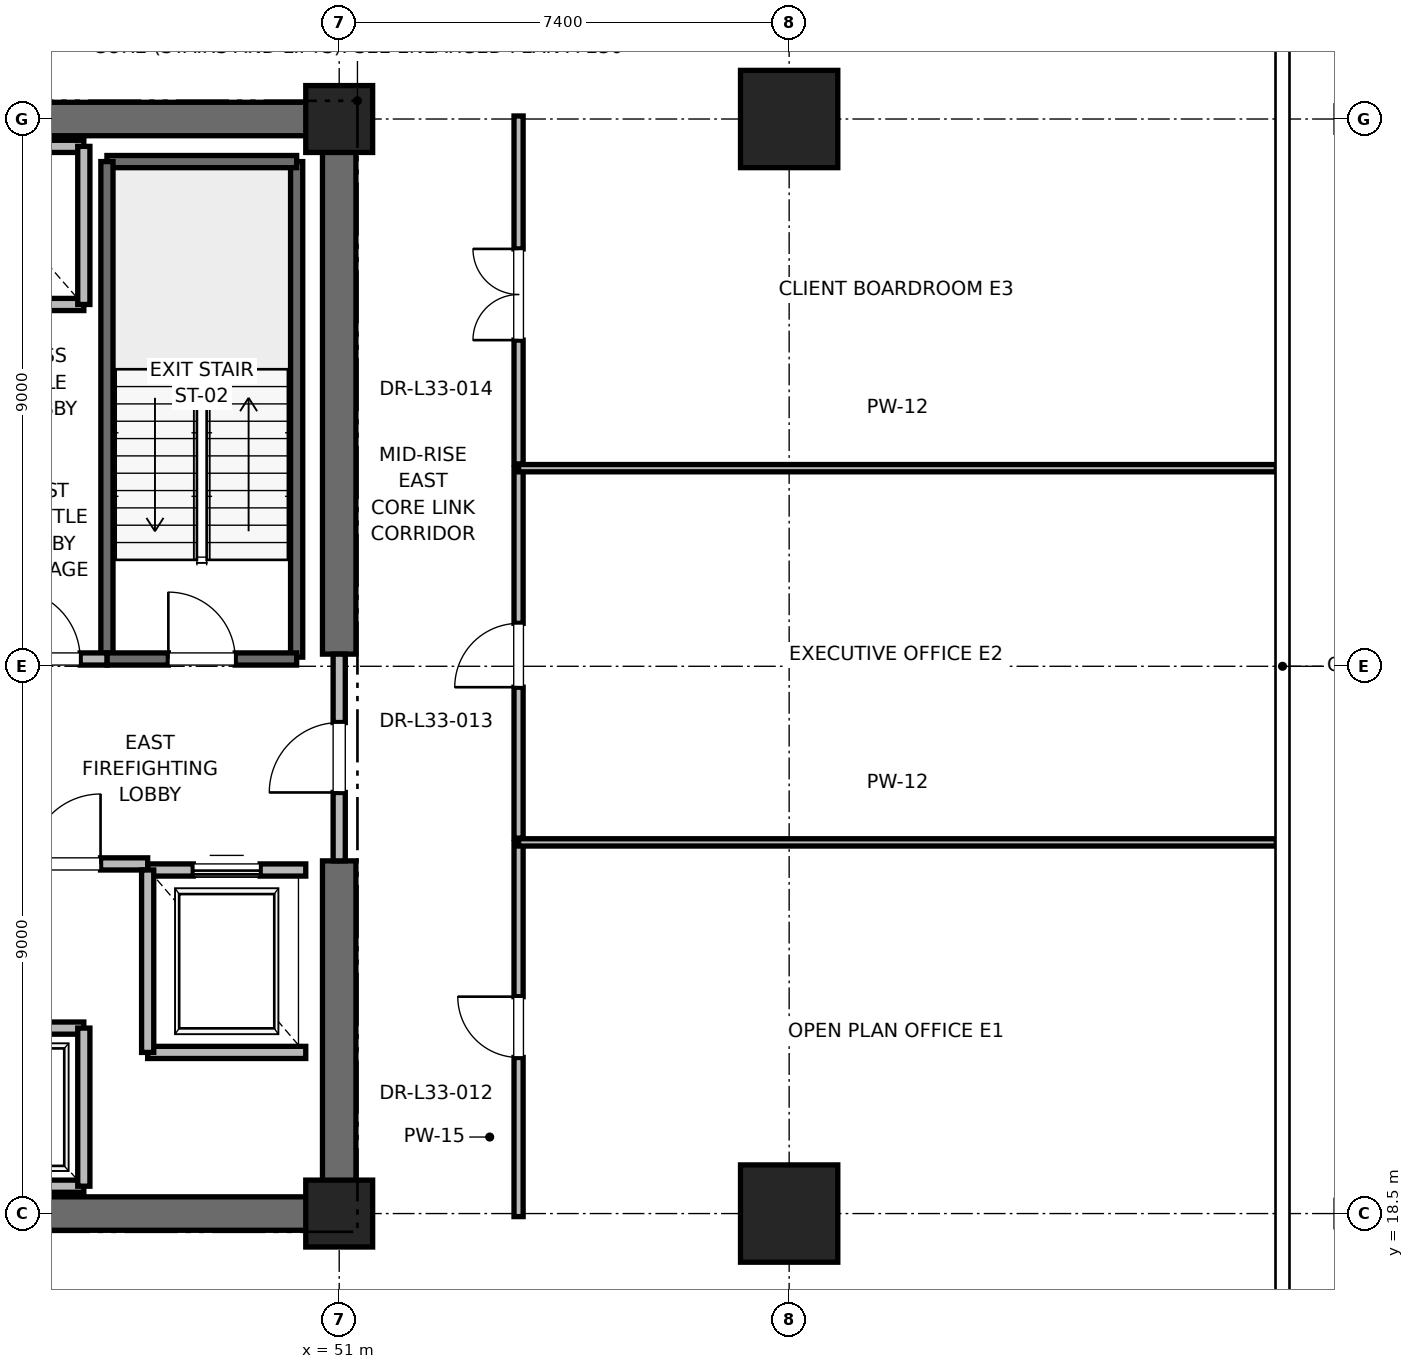
"""IFC4 building model, lengths in metres.
Left out: names, types, materials, properties, quantities, classifications, styles, units other than length and angle.
Written with IfcOpenShell. Run it as: python <this file> out.ifc"""

import sys

from ifc_helpers import new_model, si_unit, direction, frame, frame_2d, origin, origin_2d, place, context, subcontext, project, spatial, rectangle, extrude, element, fill, save


model = new_model("IFC4")
c1 = context("Model", 3, precision=1e-05, world=origin(), true_north=direction((0.0, 1.0)))
c2 = subcontext(c1, "Body", "Model", "MODEL_VIEW")
j1 = project(units=[si_unit("LENGTHUNIT", "METRE"), si_unit("PLANEANGLEUNIT", "RADIAN")], contexts=[c1])
p1 = place(None, origin())
s1 = spatial("IfcSite", under=j1, at=p1, CompositionType="ELEMENT")
p2 = place(p1, origin())
s2 = spatial("IfcBuilding", under=s1, at=p2, CompositionType="ELEMENT")
p3 = place(p2, frame((0.0, 0.0, 144.4)))
s3 = spatial("IfcBuildingStorey", under=s2, at=p3, CompositionType="ELEMENT", Elevation=144.4)
for number, where, z_axis, x_axis in (
    (1, (58.4, 18.5, 0.0), (0.0, 0.0, 1.0), (1.0, 0.0, 0.0)),
    (2, (58.4, 36.5, 0.0), (0.0, 0.0, 1.0), (1.0, 0.0, 0.0)),
):
    element("IfcColumn", number, at=place(p3, frame(where, z_axis=z_axis, x_axis=x_axis)), inside=s3, PredefinedType="COLUMN", context=c2, shape_type="SweptSolid", body=[
        extrude(rectangle(XDim=1.6, YDim=1.6, at=origin_2d()), origin(), (0.0, 0.0, 1.0), 4.0),
    ])
for number, where, z_axis, x_axis in (
    (3, (51.0, 18.5, 0.0), (0.0, 0.0, 1.0), (1.0, 0.0, 0.0)),
    (4, (51.0, 36.5, 0.0), (0.0, 0.0, 1.0), (1.0, 0.0, 0.0)),
):
    element("IfcColumn", number, at=place(p3, frame(where, z_axis=z_axis, x_axis=x_axis)), inside=s3, PredefinedType="PILASTER", context=c2, shape_type="SweptSolid", body=[
        extrude(rectangle(XDim=1.1, YDim=1.1, at=origin_2d()), origin(), (0.0, 0.0, 1.0), 4.0),
    ])
p4 = place(p3, frame((41.8, 18.5, 0.0), z_axis=(0.0, 0.0, 1.0), x_axis=(1.0, 0.0, 0.0)))
e5 = element("IfcWall", 5, at=p4, inside=s3, PredefinedType="SHEAR", context=c2, shape_type="SweptSolid", body=[
    extrude(rectangle(XDim=9.2, YDim=0.55, at=frame_2d((4.6, 0.0))), origin(), (0.0, 0.0, 1.0), 3.775),
])
for number, where, z_axis, x_axis in (
    (6, (45.2, 36.5, 0.0), (0.0, 0.0, 1.0), (1.0, 0.0, 0.0)),
    (7, (51.0, 18.5, 0.0), (0.0, 0.0, 1.0), (0.0, 1.0, 0.0)),
):
    element("IfcWall", number, at=place(p3, frame(where, z_axis=z_axis, x_axis=x_axis)), inside=s3, PredefinedType="SHEAR", context=c2, shape_type="SweptSolid", body=[
        extrude(rectangle(XDim=5.8, YDim=0.55, at=frame_2d((2.9, 0.0))), origin(), (0.0, 0.0, 1.0), 3.775),
    ])
p5 = place(p3, frame((51.0, 27.7, 0.0), z_axis=(0.0, 0.0, 1.0), x_axis=(0.0, 1.0, 0.0)))
e8 = element("IfcWall", 8, at=p5, inside=s3, PredefinedType="SHEAR", context=c2, shape_type="SweptSolid", body=[
    extrude(rectangle(XDim=8.8, YDim=0.55, at=frame_2d((4.4, 0.0))), origin(), (0.0, 0.0, 1.0), 3.775),
])
p6 = place(p3, frame((50.3, 27.65, 0.0), z_axis=(0.0, 0.0, 1.0), x_axis=(0.0, 1.0, 0.0)))
e9 = element("IfcWall", 9, at=p6, inside=s3, PredefinedType="SOLIDWALL", context=c2, shape_type="SweptSolid", body=[
    extrude(rectangle(XDim=8.15, YDim=0.2, at=frame_2d((4.075, 0.0))), origin(), (0.0, 0.0, 1.0), 3.775),
])
p7 = place(p3, frame((47.18, 35.8, 0.0), z_axis=(0.0, 0.0, 1.0), x_axis=(1.0, 0.0, 0.0)))
e10 = element("IfcWall", 10, at=p7, inside=s3, PredefinedType="SOLIDWALL", context=c2, shape_type="SweptSolid", body=[
    extrude(rectangle(XDim=3.12, YDim=0.2, at=frame_2d((1.56, 0.0))), origin(), (0.0, 0.0, 1.0), 3.775),
])
p8 = place(p3, frame((47.18, 27.62, 0.0), z_axis=(0.0, 0.0, 1.0), x_axis=(0.0, 1.0, 0.0)))
e11 = element("IfcWall", 11, at=p8, inside=s3, PredefinedType="SOLIDWALL", context=c2, shape_type="SweptSolid", body=[
    extrude(rectangle(XDim=8.18, YDim=0.2, at=frame_2d((4.09, 0.0))), origin(), (0.0, 0.0, 1.0), 3.775),
])
p9 = place(p3, frame((47.18, 27.62, 0.0), z_axis=(0.0, 0.0, 1.0), x_axis=(1.0, 0.0, 0.0)))
e12 = element("IfcWall", 12, at=p9, inside=s3, PredefinedType="SOLIDWALL", context=c2, shape_type="SweptSolid", body=[
    extrude(rectangle(XDim=3.12, YDim=0.2, at=frame_2d((1.56, 0.0))), origin(), (0.0, 0.0, 1.0), 3.775),
])
p10 = place(p9, frame((1.01, 0.0, 0.0)))
e13 = element("IfcOpeningElement", 13, at=p10, cuts=e12, PredefinedType="OPENING", context=c2, shape_type="SweptSolid", body=[
    extrude(rectangle(XDim=1.1, YDim=2.15, at=frame_2d((0.55, 1.075))), frame((0.0, 0.1, 0.0), z_axis=(0.0, -1.0, 0.0), x_axis=(1.0, 0.0, 0.0)), (0.0, 0.0, 1.0), 0.2),
])
p11 = place(p3, frame((45.15, 24.25, 0.0), z_axis=(0.0, 0.0, 1.0), x_axis=(1.0, 0.0, 0.0)))
e14 = element("IfcWall", 14, at=p11, inside=s3, PredefinedType="PARTITIONING", context=c2, shape_type="SweptSolid", body=[
    extrude(rectangle(XDim=2.7, YDim=0.2, at=frame_2d((1.35, 0.0))), origin(), (0.0, 0.0, 1.0), 3.775),
])
p12 = place(p11, frame((0.775, 0.0, 0.0)))
e15 = element("IfcOpeningElement", 15, at=p12, cuts=e14, PredefinedType="OPENING", context=c2, shape_type="SweptSolid", body=[
    extrude(rectangle(XDim=1.15, YDim=2.2, at=frame_2d((0.575, 1.1))), frame((0.0, 0.1, 0.0), z_axis=(0.0, -1.0, 0.0), x_axis=(1.0, 0.0, 0.0)), (0.0, 0.0, 1.0), 0.2),
])
p13 = place(p3, frame((45.15, 27.62, 0.0), z_axis=(0.0, 0.0, 1.0), x_axis=(1.0, 0.0, 0.0)))
e16 = element("IfcWall", 16, at=p13, inside=s3, PredefinedType="PARTITIONING", context=c2, shape_type="SweptSolid", body=[
    extrude(rectangle(XDim=2.03, YDim=0.2, at=frame_2d((1.015, 0.0))), origin(), (0.0, 0.0, 1.0), 3.775),
])
p14 = place(p13, frame((0.44, 0.0, 0.0)))
e17 = element("IfcOpeningElement", 17, at=p14, cuts=e16, PredefinedType="OPENING", context=c2, shape_type="SweptSolid", body=[
    extrude(rectangle(XDim=1.15, YDim=2.2, at=frame_2d((0.575, 1.1))), frame((0.0, 0.1, 0.0), z_axis=(0.0, -1.0, 0.0), x_axis=(1.0, 0.0, 0.0)), (0.0, 0.0, 1.0), 0.2),
])
p15 = place(p3, frame((51.0, 24.3, 0.0), z_axis=(0.0, 0.0, 1.0), x_axis=(0.0, 1.0, 0.0)))
e18 = element("IfcWall", 18, at=p15, inside=s3, PredefinedType="PARTITIONING", context=c2, shape_type="SweptSolid", body=[
    extrude(rectangle(XDim=3.4, YDim=0.2, at=frame_2d((1.7, 0.0))), origin(), (0.0, 0.0, 1.0), 2.755),
])
p16 = place(p15, frame((1.125, 0.0, 0.0)))
e19 = element("IfcOpeningElement", 19, at=p16, cuts=e18, PredefinedType="OPENING", context=c2, shape_type="SweptSolid", body=[
    extrude(rectangle(XDim=1.15, YDim=2.2, at=frame_2d((0.575, 1.1))), frame((0.0, 0.1, 0.0), z_axis=(0.0, -1.0, 0.0), x_axis=(1.0, 0.0, 0.0)), (0.0, 0.0, 1.0), 0.2),
])
p17 = place(p3, frame((47.85, 21.15, 0.0), z_axis=(0.0, 0.0, 1.0), x_axis=(1.0, 0.0, 0.0)))
e20 = element("IfcWall", 20, at=p17, inside=s3, PredefinedType="SOLIDWALL", context=c2, shape_type="SweptSolid", body=[
    extrude(rectangle(XDim=2.6, YDim=0.2, at=frame_2d((1.3, 0.0))), origin(), (0.0, 0.0, 1.0), 3.775),
])
p18 = place(p3, frame((50.45, 24.15, 0.0), z_axis=(0.0, 0.0, 1.0), x_axis=(-1.0, 0.0, 0.0)))
e21 = element("IfcWall", 21, at=p18, inside=s3, PredefinedType="SOLIDWALL", context=c2, shape_type="SweptSolid", body=[
    extrude(rectangle(XDim=2.6, YDim=0.2, at=frame_2d((1.3, 0.0))), origin(), (0.0, 0.0, 1.0), 2.755),
])
p19 = place(p18, frame((0.75, 0.0, 0.0)))
e22 = element("IfcOpeningElement", 22, at=p19, cuts=e21, PredefinedType="OPENING", context=c2, shape_type="SweptSolid", body=[
    extrude(rectangle(XDim=1.1, YDim=2.2, at=frame_2d((0.55, 1.1))), frame((0.0, 0.1, 0.0), z_axis=(0.0, -1.0, 0.0), x_axis=(1.0, 0.0, 0.0)), (0.0, 0.0, 1.0), 0.2),
])
p20 = place(p3, frame((47.85, 24.15, 0.0), z_axis=(0.0, 0.0, 1.0), x_axis=(0.0, -1.0, 0.0)))
e23 = element("IfcWall", 23, at=p20, inside=s3, PredefinedType="SOLIDWALL", context=c2, shape_type="SweptSolid", body=[
    extrude(rectangle(XDim=3.0, YDim=0.2, at=frame_2d((1.5, 0.0))), origin(), (0.0, 0.0, 1.0), 3.775),
])
p21 = place(p3, frame((44.5, 18.95, 0.0), z_axis=(0.0, 0.0, 1.0), x_axis=(1.0, 0.0, 0.0)))
e24 = element("IfcWall", 24, at=p21, inside=s3, PredefinedType="SOLIDWALL", context=c2, shape_type="SweptSolid", body=[
    extrude(rectangle(XDim=2.3, YDim=0.2, at=frame_2d((1.15, 0.0))), origin(), (0.0, 0.0, 1.0), 3.775),
])
p22 = place(p3, frame((46.8, 21.55, 0.0), z_axis=(0.0, 0.0, 1.0), x_axis=(-1.0, 0.0, 0.0)))
e25 = element("IfcWall", 25, at=p22, inside=s3, PredefinedType="SOLIDWALL", context=c2, shape_type="SweptSolid", body=[
    extrude(rectangle(XDim=2.3, YDim=0.2, at=frame_2d((1.15, 0.0))), origin(), (0.0, 0.0, 1.0), 3.775),
])
p23 = place(p22, frame((0.6, 0.0, 0.0)))
e26 = element("IfcOpeningElement", 26, at=p23, cuts=e25, PredefinedType="OPENING", context=c2, shape_type="SweptSolid", body=[
    extrude(rectangle(XDim=1.1, YDim=2.2, at=frame_2d((0.55, 1.1))), frame((0.0, 0.1, 0.0), z_axis=(0.0, -1.0, 0.0), x_axis=(1.0, 0.0, 0.0)), (0.0, 0.0, 1.0), 0.2),
])
p24 = place(p3, frame((46.8, 18.95, 0.0), z_axis=(0.0, 0.0, 1.0), x_axis=(0.0, 1.0, 0.0)))
e27 = element("IfcWall", 27, at=p24, inside=s3, PredefinedType="SOLIDWALL", context=c2, shape_type="SweptSolid", body=[
    extrude(rectangle(XDim=2.6, YDim=0.2, at=frame_2d((1.3, 0.0))), origin(), (0.0, 0.0, 1.0), 3.775),
])
p25 = place(p3, frame((44.5, 33.45, 0.0), z_axis=(0.0, 0.0, 1.0), x_axis=(1.0, 0.0, 0.0)))
e28 = element("IfcWall", 28, at=p25, inside=s3, PredefinedType="SOLIDWALL", context=c2, shape_type="SweptSolid", body=[
    extrude(rectangle(XDim=2.3, YDim=0.2, at=frame_2d((1.15, 0.0))), origin(), (0.0, 0.0, 1.0), 3.775),
])
p26 = place(p3, frame((46.8, 36.05, 0.0), z_axis=(0.0, 0.0, 1.0), x_axis=(-1.0, 0.0, 0.0)))
e29 = element("IfcWall", 29, at=p26, inside=s3, PredefinedType="SOLIDWALL", context=c2, shape_type="SweptSolid", body=[
    extrude(rectangle(XDim=2.3, YDim=0.2, at=frame_2d((1.15, 0.0))), origin(), (0.0, 0.0, 1.0), 2.755),
])
p27 = place(p3, frame((46.8, 33.45, 0.0), z_axis=(0.0, 0.0, 1.0), x_axis=(0.0, 1.0, 0.0)))
e30 = element("IfcWall", 30, at=p27, inside=s3, PredefinedType="SOLIDWALL", context=c2, shape_type="SweptSolid", body=[
    extrude(rectangle(XDim=2.6, YDim=0.2, at=frame_2d((1.3, 0.0))), origin(), (0.0, 0.0, 1.0), 3.775),
])
p28 = place(p3, frame((53.95, 18.45, 0.0), z_axis=(0.0, 0.0, 1.0), x_axis=(0.0, 1.0, 0.0)))
e31 = element("IfcWall", 31, at=p28, inside=s3, PredefinedType="PARTITIONING", context=c2, shape_type="SweptSolid", body=[
    extrude(rectangle(XDim=6.154, YDim=0.15, at=frame_2d((3.077, 0.0))), origin(), (0.0, 0.0, 1.0), 2.85),
])
p29 = place(p28, frame((2.617, 0.0, 0.0)))
e32 = element("IfcOpeningElement", 32, at=p29, cuts=e31, PredefinedType="OPENING", context=c2, shape_type="SweptSolid", body=[
    extrude(rectangle(XDim=1.0, YDim=2.15, at=frame_2d((0.5, 1.075))), frame((0.0, 0.075, 0.0), z_axis=(0.0, -1.0, 0.0), x_axis=(1.0, 0.0, 0.0)), (0.0, 0.0, 1.0), 0.15),
])
p30 = place(p3, frame((53.95, 24.604, 0.0), z_axis=(0.0, 0.0, 1.0), x_axis=(1.0, 0.0, 0.0)))
e33 = element("IfcWall", 33, at=p30, inside=s3, PredefinedType="PARTITIONING", context=c2, shape_type="SweptSolid", body=[
    extrude(rectangle(XDim=12.464, YDim=0.12, at=frame_2d((6.232, 0.0))), origin(), (0.0, 0.0, 1.0), 2.85),
])
p31 = place(p3, frame((53.95, 24.674, 0.0), z_axis=(0.0, 0.0, 1.0), x_axis=(0.0, 1.0, 0.0)))
e34 = element("IfcWall", 34, at=p31, inside=s3, PredefinedType="PARTITIONING", context=c2, shape_type="SweptSolid", body=[
    extrude(rectangle(XDim=6.084, YDim=0.15, at=frame_2d((3.042, 0.0))), origin(), (0.0, 0.0, 1.0), 2.85),
])
p32 = place(p31, frame((2.482, 0.0, 0.0)))
e35 = element("IfcOpeningElement", 35, at=p32, cuts=e34, PredefinedType="OPENING", context=c2, shape_type="SweptSolid", body=[
    extrude(rectangle(XDim=1.05, YDim=2.2, at=frame_2d((0.525, 1.1))), frame((0.0, 0.075, 0.0), z_axis=(0.0, -1.0, 0.0), x_axis=(1.0, 0.0, 0.0)), (0.0, 0.0, 1.0), 0.15),
])
p33 = place(p3, frame((53.95, 30.758, 0.0), z_axis=(0.0, 0.0, 1.0), x_axis=(1.0, 0.0, 0.0)))
e36 = element("IfcWall", 36, at=p33, inside=s3, PredefinedType="PARTITIONING", context=c2, shape_type="SweptSolid", body=[
    extrude(rectangle(XDim=12.464, YDim=0.12, at=frame_2d((6.232, 0.0))), origin(), (0.0, 0.0, 1.0), 2.85),
])
p34 = place(p3, frame((53.95, 30.828, 0.0), z_axis=(0.0, 0.0, 1.0), x_axis=(0.0, 1.0, 0.0)))
e37 = element("IfcWall", 37, at=p34, inside=s3, PredefinedType="PARTITIONING", context=c2, shape_type="SweptSolid", body=[
    extrude(rectangle(XDim=5.722, YDim=0.15, at=frame_2d((2.861, 0.0))), origin(), (0.0, 0.0, 1.0), 2.85),
])
p35 = place(p34, frame((2.036, 0.0, 0.0)))
e38 = element("IfcOpeningElement", 38, at=p35, cuts=e37, PredefinedType="OPENING", context=c2, shape_type="SweptSolid", body=[
    extrude(rectangle(XDim=1.5, YDim=2.25, at=frame_2d((0.75, 1.125))), frame((0.0, 0.075, 0.0), z_axis=(0.0, -1.0, 0.0), x_axis=(1.0, 0.0, 0.0)), (0.0, 0.0, 1.0), 0.15),
])
p36 = place(p10, origin())
e39 = element("IfcDoor", 39, at=p36, inside=s3, OperationType="SINGLE_SWING_LEFT", PredefinedType="DOOR", context=c2, shape_type="SweptSolid", body=[
    extrude(rectangle(XDim=1.1, YDim=2.15, at=frame_2d((0.55, 1.075))), frame((0.0, 0.025, 0.0), z_axis=(0.0, -1.0, 0.0), x_axis=(1.0, 0.0, 0.0)), (0.0, 0.0, 1.0), 0.05),
])
fill(e13, e39)
p37 = place(p12, origin())
e40 = element("IfcDoor", 40, at=p37, inside=s3, OperationType="SINGLE_SWING_RIGHT", PredefinedType="DOOR", context=c2, shape_type="SweptSolid", body=[
    extrude(rectangle(XDim=1.15, YDim=2.2, at=frame_2d((0.575, 1.1))), frame((0.0, 0.025, 0.0), z_axis=(0.0, -1.0, 0.0), x_axis=(1.0, 0.0, 0.0)), (0.0, 0.0, 1.0), 0.05),
])
fill(e15, e40)
p38 = place(p14, origin())
e41 = element("IfcDoor", 41, at=p38, inside=s3, OperationType="SINGLE_SWING_LEFT", PredefinedType="DOOR", context=c2, shape_type="SweptSolid", body=[
    extrude(rectangle(XDim=1.15, YDim=2.2, at=frame_2d((0.575, 1.1))), frame((0.0, 0.025, 0.0), z_axis=(0.0, -1.0, 0.0), x_axis=(1.0, 0.0, 0.0)), (0.0, 0.0, 1.0), 0.05),
])
fill(e17, e41)
p39 = place(p16, origin())
e42 = element("IfcDoor", 42, at=p39, inside=s3, OperationType="SINGLE_SWING_LEFT", PredefinedType="DOOR", context=c2, shape_type="SweptSolid", body=[
    extrude(rectangle(XDim=1.15, YDim=2.2, at=frame_2d((0.575, 1.1))), frame((0.0, 0.025, 0.0), z_axis=(0.0, -1.0, 0.0), x_axis=(1.0, 0.0, 0.0)), (0.0, 0.0, 1.0), 0.05),
])
fill(e19, e42)
p40 = place(p19, origin())
e43 = element("IfcDoor", 43, at=p40, inside=s3, OperationType="SLIDING_TO_RIGHT", PredefinedType="DOOR", context=c2, shape_type="SweptSolid", body=[
    extrude(rectangle(XDim=1.1, YDim=2.2, at=frame_2d((0.55, 1.1))), frame((0.0, 0.025, 0.0), z_axis=(0.0, -1.0, 0.0), x_axis=(1.0, 0.0, 0.0)), (0.0, 0.0, 1.0), 0.05),
])
fill(e22, e43)
p41 = place(p29, origin())
e44 = element("IfcDoor", 44, at=p41, inside=s3, OperationType="SINGLE_SWING_RIGHT", PredefinedType="DOOR", context=c2, shape_type="SweptSolid", body=[
    extrude(rectangle(XDim=1.0, YDim=2.15, at=frame_2d((0.5, 1.075))), frame((0.0, 0.025, 0.0), z_axis=(0.0, -1.0, 0.0), x_axis=(1.0, 0.0, 0.0)), (0.0, 0.0, 1.0), 0.05),
])
fill(e32, e44)
p42 = place(p32, origin())
e45 = element("IfcDoor", 45, at=p42, inside=s3, OperationType="SINGLE_SWING_LEFT", PredefinedType="DOOR", context=c2, shape_type="SweptSolid", body=[
    extrude(rectangle(XDim=1.05, YDim=2.2, at=frame_2d((0.525, 1.1))), frame((0.0, 0.025, 0.0), z_axis=(0.0, -1.0, 0.0), x_axis=(1.0, 0.0, 0.0)), (0.0, 0.0, 1.0), 0.05),
])
fill(e35, e45)
p43 = place(p35, origin())
e46 = element("IfcDoor", 46, at=p43, inside=s3, OperationType="DOUBLE_DOOR_SINGLE_SWING", PredefinedType="DOOR", context=c2, shape_type="SweptSolid", body=[
    extrude(rectangle(XDim=1.5, YDim=2.25, at=frame_2d((0.75, 1.125))), frame((0.0, 0.025, 0.0), z_axis=(0.0, -1.0, 0.0), x_axis=(1.0, 0.0, 0.0)), (0.0, 0.0, 1.0), 0.05),
])
fill(e38, e46)
save(model, sys.argv[1])
